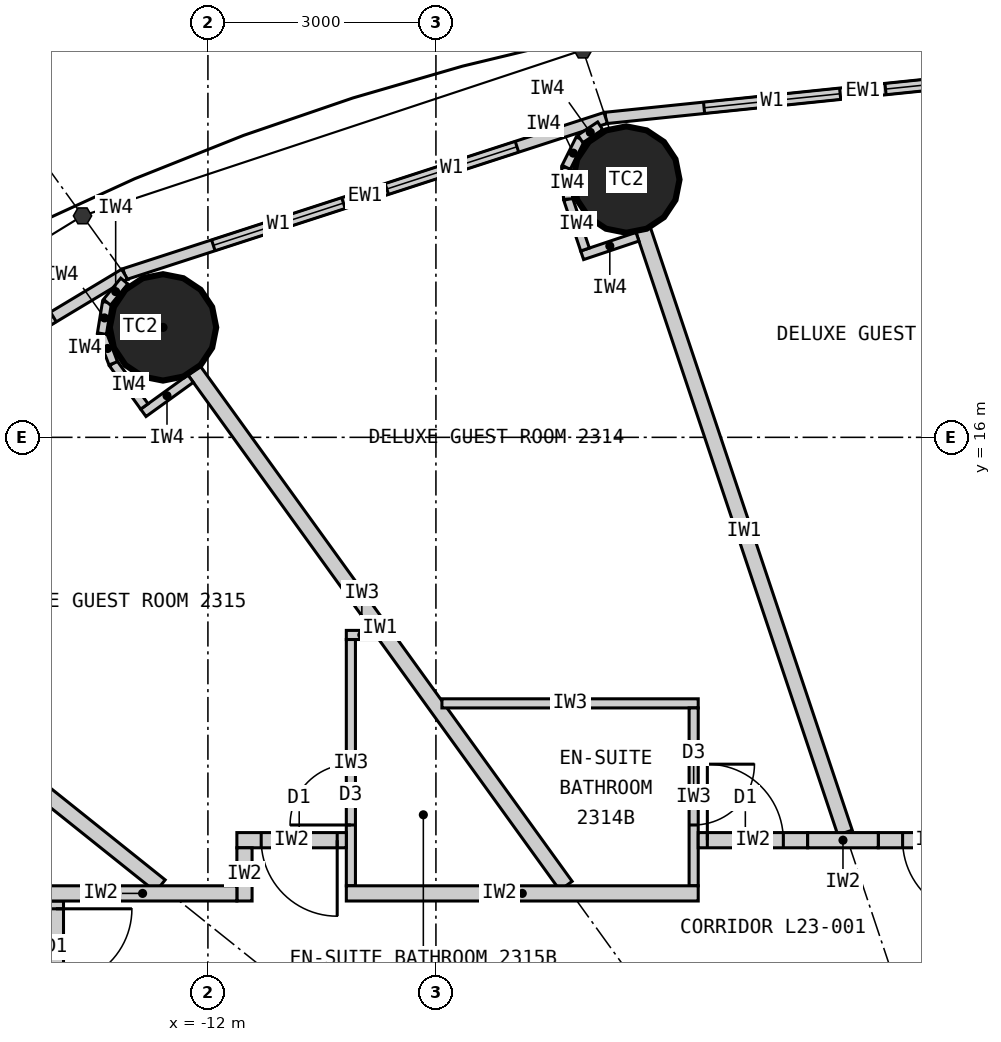
"""IFC4 building model, lengths in metres.
Left out: names, types, materials, properties, quantities, classifications, styles, units other than length and angle.
Written with IfcOpenShell. Run it as: python <this file> out.ifc"""

import sys

from ifc_helpers import new_model, si_unit, direction, frame, frame_2d, origin, origin_2d, place, context, subcontext, project, spatial, rectangle, circle, extrude, clip, halfspace, element, fill, save


model = new_model("IFC4")
c1 = context("Model", 3, precision=1e-05, world=origin(), true_north=direction((0.0, 1.0)))
c2 = subcontext(c1, "Body", "Model", "MODEL_VIEW")
j1 = project(units=[si_unit("LENGTHUNIT", "METRE"), si_unit("PLANEANGLEUNIT", "RADIAN")], contexts=[c1])
p1 = place(None, origin())
s1 = spatial("IfcSite", under=j1, at=p1, CompositionType="ELEMENT")
p2 = place(p1, origin())
s2 = spatial("IfcBuilding", under=s1, at=p2, CompositionType="ELEMENT")
p3 = place(p2, frame((0.0, 0.0, 90.3)))
s3 = spatial("IfcBuildingStorey", under=s2, at=p3, CompositionType="ELEMENT", Elevation=90.3)
for number, where, z_axis, x_axis in (
    (1, (-6.495, 19.391, 0.0), (0.0, 0.0, 1.0), (1.0, 0.0, 0.0)),
    (2, (-12.591, 17.447, 0.0), (0.0, 0.0, 1.0), (1.0, 0.0, 0.0)),
):
    element("IfcColumn", number, at=place(p3, frame(where, z_axis=z_axis, x_axis=x_axis)), inside=s3, PredefinedType="COLUMN", context=c2, shape_type="Clipping", body=[
        clip(extrude(circle(Radius=0.7, at=origin_2d()), origin(), (0.0, 0.0, 1.0), 3.3), halfspace(frame((0.0, 0.0, 2.25), z_axis=(0.0, 0.0, 1.0), x_axis=(1.0, 0.0, 0.0)), False)),
    ])
p4 = place(p3, frame((0.0, 20.9, 0.0), z_axis=(0.0, 0.0, 1.0), x_axis=(-0.994721394369, -0.102612609291, 0.0)))
e3 = element("IfcWall", 3, at=p4, inside=s3, PredefinedType="ELEMENTEDWALL", context=c2, shape_type="SweptSolid", body=[
    extrude(rectangle(XDim=6.802, YDim=0.15, at=frame_2d((3.401, 0.0))), origin(), (0.0, 0.0, 1.0), 3.05),
])
p5 = place(p4, frame((1.301, 0.0, 0.9)))
e4 = element("IfcOpeningElement", 4, at=p5, cuts=e3, PredefinedType="OPENING", context=c2, shape_type="SweptSolid", body=[
    extrude(rectangle(XDim=1.8, YDim=1.9, at=frame_2d((0.9, 0.95))), frame((0.0, 0.085, 0.0), z_axis=(0.0, -1.0, 0.0), x_axis=(1.0, 0.0, 0.0)), (0.0, 0.0, 1.0), 0.17),
])
p6 = place(p4, frame((3.701, 0.0, 0.9)))
e5 = element("IfcOpeningElement", 5, at=p6, cuts=e3, PredefinedType="OPENING", context=c2, shape_type="SweptSolid", body=[
    extrude(rectangle(XDim=1.8, YDim=1.9, at=frame_2d((0.9, 0.95))), frame((0.0, 0.085, 0.0), z_axis=(0.0, -1.0, 0.0), x_axis=(1.0, 0.0, 0.0)), (0.0, 0.0, 1.0), 0.17),
])
p7 = place(p3, frame((-6.766, 20.202, 0.0), z_axis=(0.0, 0.0, 1.0), x_axis=(-0.951137534625, -0.308767534285, 0.0)))
e6 = element("IfcWall", 6, at=p7, inside=s3, PredefinedType="ELEMENTEDWALL", context=c2, shape_type="SweptSolid", body=[
    extrude(rectangle(XDim=6.655, YDim=0.15, at=frame_2d((3.328, 0.0))), origin(), (0.0, 0.0, 1.0), 3.05),
])
p8 = place(p7, frame((1.228, 0.0, 0.9)))
e7 = element("IfcOpeningElement", 7, at=p8, cuts=e6, PredefinedType="OPENING", context=c2, shape_type="SweptSolid", body=[
    extrude(rectangle(XDim=1.8, YDim=1.9, at=frame_2d((0.9, 0.95))), frame((0.0, 0.085, 0.0), z_axis=(0.0, -1.0, 0.0), x_axis=(1.0, 0.0, 0.0)), (0.0, 0.0, 1.0), 0.17),
])
p9 = place(p7, frame((3.628, 0.0, 0.9)))
e8 = element("IfcOpeningElement", 8, at=p9, cuts=e6, PredefinedType="OPENING", context=c2, shape_type="SweptSolid", body=[
    extrude(rectangle(XDim=1.8, YDim=1.9, at=frame_2d((0.9, 0.95))), frame((0.0, 0.085, 0.0), z_axis=(0.0, -1.0, 0.0), x_axis=(1.0, 0.0, 0.0)), (0.0, 0.0, 1.0), 0.17),
])
p10 = place(p3, frame((-13.096, 18.147, 0.0), z_axis=(0.0, 0.0, 1.0), x_axis=(-0.856983180864, -0.515344377787, 0.0)))
e9 = element("IfcWall", 9, at=p10, inside=s3, PredefinedType="ELEMENTEDWALL", context=c2, shape_type="SweptSolid", body=[
    extrude(rectangle(XDim=6.386, YDim=0.15, at=frame_2d((3.193, 0.0))), origin(), (0.0, 0.0, 1.0), 3.05),
])
p11 = place(p10, frame((1.093, 0.0, 0.9)))
e10 = element("IfcOpeningElement", 10, at=p11, cuts=e9, PredefinedType="OPENING", context=c2, shape_type="SweptSolid", body=[
    extrude(rectangle(XDim=1.8, YDim=1.9, at=frame_2d((0.9, 0.95))), frame((0.0, 0.085, 0.0), z_axis=(0.0, -1.0, 0.0), x_axis=(1.0, 0.0, 0.0)), (0.0, 0.0, 1.0), 0.17),
])
p12 = place(p10, frame((3.493, 0.0, 0.9)))
e11 = element("IfcOpeningElement", 11, at=p12, cuts=e9, PredefinedType="OPENING", context=c2, shape_type="SweptSolid", body=[
    extrude(rectangle(XDim=1.8, YDim=1.9, at=frame_2d((0.9, 0.95))), frame((0.0, 0.085, 0.0), z_axis=(0.0, -1.0, 0.0), x_axis=(1.0, 0.0, 0.0)), (0.0, 0.0, 1.0), 0.17),
])
p13 = place(p3, frame((-3.617, 10.8, 0.0), z_axis=(0.0, 0.0, 1.0), x_axis=(-0.317576599239, 0.948232621046, 0.0)))
e12 = element("IfcWall", 12, at=p13, inside=s3, PredefinedType="PARTITIONING", context=c2, shape_type="SweptSolid", body=[
    extrude(rectangle(XDim=8.36, YDim=0.2, at=frame_2d((4.18, 0.0))), origin(), (0.0, 0.0, 1.0), 2.15),
])
p14 = place(p3, frame((-7.289, 10.1, 0.0), z_axis=(0.0, 0.0, 1.0), x_axis=(-0.585198353053, 0.810890182197, 0.0)))
e13 = element("IfcWall", 13, at=p14, inside=s3, PredefinedType="PARTITIONING", context=c2, shape_type="SweptSolid", body=[
    extrude(rectangle(XDim=8.36, YDim=0.2, at=frame_2d((4.18, 0.0))), origin(), (0.0, 0.0, 1.0), 2.15),
])
p15 = place(p3, frame((-12.625, 10.1, 0.0), z_axis=(0.0, 0.0, 1.0), x_axis=(-0.780892451574, 0.624665493744, 0.0)))
e14 = element("IfcWall", 14, at=p15, inside=s3, PredefinedType="PARTITIONING", context=c2, shape_type="SweptSolid", body=[
    extrude(rectangle(XDim=6.045, YDim=0.2, at=frame_2d((3.022, 0.0))), origin(), (0.0, 0.0, 1.0), 2.25),
])
p16 = place(p3, frame((-8.921, 12.5, 0.0), z_axis=(0.0, 0.0, 1.0), x_axis=(1.0, 0.0, 0.0)))
e15 = element("IfcWall", 15, at=p16, inside=s3, PredefinedType="PARTITIONING", context=c2, shape_type="SweptSolid", body=[
    extrude(rectangle(XDim=3.372, YDim=0.12, at=frame_2d((1.686, 0.0))), origin(), (0.0, 0.0, 1.0), 3.05),
])
p17 = place(p3, frame((-5.609, 10.1, 0.0), z_axis=(0.0, 0.0, 1.0), x_axis=(0.0, 1.0, 0.0)))
e16 = element("IfcWall", 16, at=p17, inside=s3, PredefinedType="PARTITIONING", context=c2, shape_type="SweptSolid", body=[
    extrude(rectangle(XDim=2.34, YDim=0.12, at=frame_2d((1.17, 0.0))), origin(), (0.0, 0.0, 1.0), 3.05),
])
p18 = place(p17, frame((0.8, 0.0, 0.0)))
e17 = element("IfcOpeningElement", 17, at=p18, cuts=e16, PredefinedType="OPENING", context=c2, shape_type="SweptSolid", body=[
    extrude(rectangle(XDim=0.8, YDim=2.1, at=frame_2d((0.4, 1.05))), frame((0.0, 0.07, 0.0), z_axis=(0.0, -1.0, 0.0), x_axis=(1.0, 0.0, 0.0)), (0.0, 0.0, 1.0), 0.14),
])
p19 = place(p3, frame((-9.771, 13.4, 0.0), z_axis=(0.0, 0.0, 1.0), x_axis=(-1.0, 0.0, 0.0)))
e18 = element("IfcWall", 18, at=p19, inside=s3, PredefinedType="PARTITIONING", context=c2, shape_type="SweptSolid", body=[
    extrude(rectangle(XDim=0.408, YDim=0.12, at=frame_2d((0.204, 0.0))), origin(), (0.0, 0.0, 1.0), 3.05),
])
p20 = place(p3, frame((-10.119, 10.1, 0.0), z_axis=(0.0, 0.0, 1.0), x_axis=(0.0, 1.0, 0.0)))
e19 = element("IfcWall", 19, at=p20, inside=s3, PredefinedType="PARTITIONING", context=c2, shape_type="SweptSolid", body=[
    extrude(rectangle(XDim=3.24, YDim=0.12, at=frame_2d((1.62, 0.0))), origin(), (0.0, 0.0, 1.0), 3.05),
])
p21 = place(p20, frame((0.8, 0.0, 0.0)))
e20 = element("IfcOpeningElement", 20, at=p21, cuts=e19, PredefinedType="OPENING", context=c2, shape_type="SweptSolid", body=[
    extrude(rectangle(XDim=0.8, YDim=2.1, at=frame_2d((0.4, 1.05))), frame((0.0, 0.07, 0.0), z_axis=(0.0, -1.0, 0.0), x_axis=(1.0, 0.0, 0.0)), (0.0, 0.0, 1.0), 0.14),
])
p22 = place(p3, frame((-3.18, 10.7, 0.0), z_axis=(0.0, 0.0, 1.0), x_axis=(1.0, 0.0, 0.0)))
e21 = element("IfcWall", 21, at=p22, inside=s3, PredefinedType="PARTITIONING", context=c2, shape_type="SweptSolid", body=[
    extrude(rectangle(XDim=1.44, YDim=0.2, at=frame_2d((0.72, 0.0))), origin(), (0.0, 0.0, 1.0), 3.05),
])
p23 = place(p22, frame((0.32, 0.0, 0.0)))
e22 = element("IfcOpeningElement", 22, at=p23, cuts=e21, PredefinedType="OPENING", context=c2, shape_type="SweptSolid", body=[
    extrude(rectangle(XDim=1.0, YDim=2.2, at=frame_2d((0.5, 1.1))), frame((0.0, 0.11, 0.0), z_axis=(0.0, -1.0, 0.0), x_axis=(1.0, 0.0, 0.0)), (0.0, 0.0, 1.0), 0.22),
])
p24 = place(p3, frame((-5.549, 10.7, 0.0), z_axis=(0.0, 0.0, 1.0), x_axis=(1.0, 0.0, 0.0)))
e23 = element("IfcWall", 23, at=p24, inside=s3, PredefinedType="PARTITIONING", context=c2, shape_type="SweptSolid", body=[
    extrude(rectangle(XDim=1.44, YDim=0.2, at=frame_2d((0.72, 0.0))), origin(), (0.0, 0.0, 1.0), 3.05),
])
p25 = place(p24, frame((0.12, 0.0, 0.0)))
e24 = element("IfcOpeningElement", 24, at=p25, cuts=e23, PredefinedType="OPENING", context=c2, shape_type="SweptSolid", body=[
    extrude(rectangle(XDim=1.0, YDim=2.2, at=frame_2d((0.5, 1.1))), frame((0.0, 0.11, 0.0), z_axis=(0.0, -1.0, 0.0), x_axis=(1.0, 0.0, 0.0)), (0.0, 0.0, 1.0), 0.22),
])
p26 = place(p3, frame((-11.619, 10.7, 0.0), z_axis=(0.0, 0.0, 1.0), x_axis=(1.0, 0.0, 0.0)))
e25 = element("IfcWall", 25, at=p26, inside=s3, PredefinedType="PARTITIONING", context=c2, shape_type="SweptSolid", body=[
    extrude(rectangle(XDim=1.44, YDim=0.2, at=frame_2d((0.72, 0.0))), origin(), (0.0, 0.0, 1.0), 3.05),
])
p27 = place(p26, frame((0.32, 0.0, 0.0)))
e26 = element("IfcOpeningElement", 26, at=p27, cuts=e25, PredefinedType="OPENING", context=c2, shape_type="SweptSolid", body=[
    extrude(rectangle(XDim=1.0, YDim=2.2, at=frame_2d((0.5, 1.1))), frame((0.0, 0.11, 0.0), z_axis=(0.0, -1.0, 0.0), x_axis=(1.0, 0.0, 0.0)), (0.0, 0.0, 1.0), 0.22),
])
p28 = place(p3, frame((-11.519, 9.9, 0.0), z_axis=(0.0, 0.0, 1.0), x_axis=(0.0, 1.0, 0.0)))
e27 = element("IfcWall", 27, at=p28, inside=s3, PredefinedType="PARTITIONING", context=c2, shape_type="SweptSolid", body=[
    extrude(rectangle(XDim=0.7, YDim=0.2, at=frame_2d((0.35, 0.0))), origin(), (0.0, 0.0, 1.0), 3.05),
])
p29 = place(p3, frame((-4.109, 10.7, 0.0), z_axis=(0.0, 0.0, 1.0), x_axis=(1.0, 0.0, 0.0)))
e28 = element("IfcWall", 28, at=p29, inside=s3, PredefinedType="PARTITIONING", context=c2, shape_type="SweptSolid", body=[
    extrude(rectangle(XDim=0.929, YDim=0.2, at=frame_2d((0.465, 0.0))), origin(), (0.0, 0.0, 1.0), 3.05),
])
p30 = place(p3, frame((-14.0, 9.9, 0.0), z_axis=(0.0, 0.0, 1.0), x_axis=(0.0, -1.0, 0.0)))
e29 = element("IfcWall", 29, at=p30, inside=s3, PredefinedType="PARTITIONING", context=c2, shape_type="SweptSolid", body=[
    extrude(rectangle(XDim=5.127, YDim=0.2, at=frame_2d((2.564, 0.0))), origin(), (0.0, 0.0, 1.0), 3.05),
])
p31 = place(p30, frame((0.103, 0.0, 0.0)))
e30 = element("IfcOpeningElement", 30, at=p31, cuts=e29, PredefinedType="OPENING", context=c2, shape_type="SweptSolid", body=[
    extrude(rectangle(XDim=1.0, YDim=2.2, at=frame_2d((0.5, 1.1))), frame((0.0, 0.11, 0.0), z_axis=(0.0, -1.0, 0.0), x_axis=(1.0, 0.0, 0.0)), (0.0, 0.0, 1.0), 0.22),
])
p32 = place(p3, frame((-14.1, 10.0, 0.0), z_axis=(0.0, 0.0, 1.0), x_axis=(1.0, 0.0, 0.0)))
e31 = element("IfcWall", 31, at=p32, inside=s3, PredefinedType="PARTITIONING", context=c2, shape_type="SweptSolid", body=[
    extrude(rectangle(XDim=2.481, YDim=0.2, at=frame_2d((1.24, 0.0))), origin(), (0.0, 0.0, 1.0), 3.05),
])
p33 = place(p3, frame((-10.179, 10.0, 0.0), z_axis=(0.0, 0.0, 1.0), x_axis=(1.0, 0.0, 0.0)))
e32 = element("IfcWall", 32, at=p33, inside=s3, PredefinedType="PARTITIONING", context=c2, shape_type="SweptSolid", body=[
    extrude(rectangle(XDim=4.63, YDim=0.2, at=frame_2d((2.315, 0.0))), origin(), (0.0, 0.0, 1.0), 3.05),
])
p34 = place(p3, frame((-6.348, 18.639, 0.0), z_axis=(0.0, 0.0, 1.0), x_axis=(-0.948268951266, -0.317468102437, 0.0)))
e33 = element("IfcWall", 33, at=p34, inside=s3, PredefinedType="PARTITIONING", context=c2, shape_type="SweptSolid", body=[
    extrude(rectangle(XDim=0.768, YDim=0.12, at=frame_2d((0.384, 0.0))), origin(), (0.0, 0.0, 1.0), 3.05),
])
p35 = place(p3, frame((-7.038, 18.471, 0.0), z_axis=(0.0, 0.0, 1.0), x_axis=(-0.317378466199, 0.9482989556, 0.0)))
e34 = element("IfcWall", 34, at=p35, inside=s3, PredefinedType="PARTITIONING", context=c2, shape_type="SweptSolid", body=[
    extrude(rectangle(XDim=0.7, YDim=0.12, at=frame_2d((0.35, 0.0))), origin(), (0.0, 0.0, 1.0), 3.05),
])
p36 = place(p3, frame((-7.26, 19.135, 0.0), z_axis=(0.0, 0.0, 1.0), x_axis=(-0.0613238046, 0.99811792439, 0.0)))
e35 = element("IfcWall", 35, at=p36, inside=s3, PredefinedType="PARTITIONING", context=c2, shape_type="SweptSolid", body=[
    extrude(rectangle(XDim=0.418, YDim=0.12, at=frame_2d((0.209, 0.0))), origin(), (0.0, 0.0, 1.0), 3.05),
])
p37 = place(p3, frame((-7.286, 19.552, 0.0), z_axis=(0.0, 0.0, 1.0), x_axis=(0.445810757773, 0.89512723579, 0.0)))
e36 = element("IfcWall", 36, at=p37, inside=s3, PredefinedType="PARTITIONING", context=c2, shape_type="SweptSolid", body=[
    extrude(rectangle(XDim=0.418, YDim=0.12, at=frame_2d((0.209, 0.0))), origin(), (0.0, 0.0, 1.0), 3.05),
])
p38 = place(p3, frame((-7.1, 19.926, 0.0), z_axis=(0.0, 0.0, 1.0), x_axis=(0.833488262509, 0.552537162787, 0.0)))
e37 = element("IfcWall", 37, at=p38, inside=s3, PredefinedType="PARTITIONING", context=c2, shape_type="SweptSolid", body=[
    extrude(rectangle(XDim=0.313, YDim=0.12, at=frame_2d((0.156, 0.0))), origin(), (0.0, 0.0, 1.0), 3.05),
])
p39 = place(p3, frame((-12.227, 16.772, 0.0), z_axis=(0.0, 0.0, 1.0), x_axis=(-0.810821798253, -0.585293098778, 0.0)))
e38 = element("IfcWall", 38, at=p39, inside=s3, PredefinedType="PARTITIONING", context=c2, shape_type="SweptSolid", body=[
    extrude(rectangle(XDim=0.768, YDim=0.12, at=frame_2d((0.384, 0.0))), origin(), (0.0, 0.0, 1.0), 3.05),
])
p40 = place(p3, frame((-12.836, 16.406, 0.0), z_axis=(0.0, 0.0, 1.0), x_axis=(-0.585223113993, 0.810872312296, 0.0)))
e39 = element("IfcWall", 39, at=p40, inside=s3, PredefinedType="PARTITIONING", context=c2, shape_type="SweptSolid", body=[
    extrude(rectangle(XDim=0.7, YDim=0.12, at=frame_2d((0.35, 0.0))), origin(), (0.0, 0.0, 1.0), 3.05),
])
p41 = place(p3, frame((-13.246, 16.974, 0.0), z_axis=(0.0, 0.0, 1.0), x_axis=(-0.355728122235, 0.934589483705, 0.0)))
e40 = element("IfcWall", 40, at=p41, inside=s3, PredefinedType="PARTITIONING", context=c2, shape_type="SweptSolid", body=[
    extrude(rectangle(XDim=0.418, YDim=0.12, at=frame_2d((0.209, 0.0))), origin(), (0.0, 0.0, 1.0), 3.05),
])
p42 = place(p3, frame((-13.394, 17.365, 0.0), z_axis=(0.0, 0.0, 1.0), x_axis=(0.159379276926, 0.987217425943, 0.0)))
e41 = element("IfcWall", 41, at=p42, inside=s3, PredefinedType="PARTITIONING", context=c2, shape_type="SweptSolid", body=[
    extrude(rectangle(XDim=0.418, YDim=0.12, at=frame_2d((0.209, 0.0))), origin(), (0.0, 0.0, 1.0), 3.05),
])
p43 = place(p3, frame((-13.328, 17.777, 0.0), z_axis=(0.0, 0.0, 1.0), x_axis=(0.632276783541, 0.774742582407, 0.0)))
e42 = element("IfcWall", 42, at=p43, inside=s3, PredefinedType="PARTITIONING", context=c2, shape_type="SweptSolid", body=[
    extrude(rectangle(XDim=0.36, YDim=0.12, at=frame_2d((0.18, 0.0))), origin(), (0.0, 0.0, 1.0), 3.05),
])
p44 = place(p5, origin())
e43 = element("IfcWindow", 43, at=p44, inside=s3, PartitioningType="SINGLE_PANEL", PredefinedType="WINDOW", context=c2, shape_type="SweptSolid", body=[
    extrude(rectangle(XDim=1.8, YDim=1.9, at=frame_2d((0.9, 0.95))), frame((0.0, 0.03, 0.0), z_axis=(0.0, -1.0, 0.0), x_axis=(1.0, 0.0, 0.0)), (0.0, 0.0, 1.0), 0.06),
])
fill(e4, e43)
p45 = place(p6, origin())
e44 = element("IfcWindow", 44, at=p45, inside=s3, PartitioningType="SINGLE_PANEL", PredefinedType="WINDOW", context=c2, shape_type="SweptSolid", body=[
    extrude(rectangle(XDim=1.8, YDim=1.9, at=frame_2d((0.9, 0.95))), frame((0.0, 0.03, 0.0), z_axis=(0.0, -1.0, 0.0), x_axis=(1.0, 0.0, 0.0)), (0.0, 0.0, 1.0), 0.06),
])
fill(e5, e44)
p46 = place(p8, origin())
e45 = element("IfcWindow", 45, at=p46, inside=s3, PartitioningType="SINGLE_PANEL", PredefinedType="WINDOW", context=c2, shape_type="SweptSolid", body=[
    extrude(rectangle(XDim=1.8, YDim=1.9, at=frame_2d((0.9, 0.95))), frame((0.0, 0.03, 0.0), z_axis=(0.0, -1.0, 0.0), x_axis=(1.0, 0.0, 0.0)), (0.0, 0.0, 1.0), 0.06),
])
fill(e7, e45)
p47 = place(p9, origin())
e46 = element("IfcWindow", 46, at=p47, inside=s3, PartitioningType="SINGLE_PANEL", PredefinedType="WINDOW", context=c2, shape_type="SweptSolid", body=[
    extrude(rectangle(XDim=1.8, YDim=1.9, at=frame_2d((0.9, 0.95))), frame((0.0, 0.03, 0.0), z_axis=(0.0, -1.0, 0.0), x_axis=(1.0, 0.0, 0.0)), (0.0, 0.0, 1.0), 0.06),
])
fill(e8, e46)
p48 = place(p11, origin())
e47 = element("IfcWindow", 47, at=p48, inside=s3, PartitioningType="SINGLE_PANEL", PredefinedType="WINDOW", context=c2, shape_type="SweptSolid", body=[
    extrude(rectangle(XDim=1.8, YDim=1.9, at=frame_2d((0.9, 0.95))), frame((0.0, 0.03, 0.0), z_axis=(0.0, -1.0, 0.0), x_axis=(1.0, 0.0, 0.0)), (0.0, 0.0, 1.0), 0.06),
])
fill(e10, e47)
p49 = place(p23, origin())
e48 = element("IfcDoor", 48, at=p49, inside=s3, OperationType="SINGLE_SWING_RIGHT", PredefinedType="DOOR", context=c2, shape_type="SweptSolid", body=[
    extrude(rectangle(XDim=1.0, YDim=2.2, at=frame_2d((0.5, 1.1))), frame((0.0, 0.025, 0.0), z_axis=(0.0, -1.0, 0.0), x_axis=(1.0, 0.0, 0.0)), (0.0, 0.0, 1.0), 0.05),
])
fill(e22, e48)
p50 = place(p18, origin())
e49 = element("IfcDoor", 49, at=p50, inside=s3, OperationType="SINGLE_SWING_RIGHT", PredefinedType="DOOR", context=c2, shape_type="SweptSolid", body=[
    extrude(rectangle(XDim=0.8, YDim=2.1, at=frame_2d((0.4, 1.05))), frame((0.0, 0.025, 0.0), z_axis=(0.0, -1.0, 0.0), x_axis=(1.0, 0.0, 0.0)), (0.0, 0.0, 1.0), 0.05),
])
fill(e17, e49)
p51 = place(p25, origin())
e50 = element("IfcDoor", 50, at=p51, inside=s3, OperationType="SINGLE_SWING_LEFT", PredefinedType="DOOR", context=c2, shape_type="SweptSolid", body=[
    extrude(rectangle(XDim=1.0, YDim=2.2, at=frame_2d((0.5, 1.1))), frame((0.0, 0.025, 0.0), z_axis=(0.0, -1.0, 0.0), x_axis=(1.0, 0.0, 0.0)), (0.0, 0.0, 1.0), 0.05),
])
fill(e24, e50)
p52 = place(p21, origin())
e51 = element("IfcDoor", 51, at=p52, inside=s3, OperationType="SINGLE_SWING_LEFT", PredefinedType="DOOR", context=c2, shape_type="SweptSolid", body=[
    extrude(rectangle(XDim=0.8, YDim=2.1, at=frame_2d((0.4, 1.05))), frame((0.0, 0.025, 0.0), z_axis=(0.0, -1.0, 0.0), x_axis=(1.0, 0.0, 0.0)), (0.0, 0.0, 1.0), 0.05),
])
fill(e20, e51)
p53 = place(p27, origin())
e52 = element("IfcDoor", 52, at=p53, inside=s3, OperationType="SINGLE_SWING_RIGHT", PredefinedType="DOOR", context=c2, shape_type="SweptSolid", body=[
    extrude(rectangle(XDim=1.0, YDim=2.2, at=frame_2d((0.5, 1.1))), frame((0.0, 0.025, 0.0), z_axis=(0.0, -1.0, 0.0), x_axis=(1.0, 0.0, 0.0)), (0.0, 0.0, 1.0), 0.05),
])
fill(e26, e52)
p54 = place(p31, origin())
e53 = element("IfcDoor", 53, at=p54, inside=s3, OperationType="SINGLE_SWING_LEFT", PredefinedType="DOOR", context=c2, shape_type="SweptSolid", body=[
    extrude(rectangle(XDim=1.0, YDim=2.2, at=frame_2d((0.5, 1.1))), frame((0.0, 0.025, 0.0), z_axis=(0.0, -1.0, 0.0), x_axis=(1.0, 0.0, 0.0)), (0.0, 0.0, 1.0), 0.05),
])
fill(e30, e53)
save(model, sys.argv[1])
